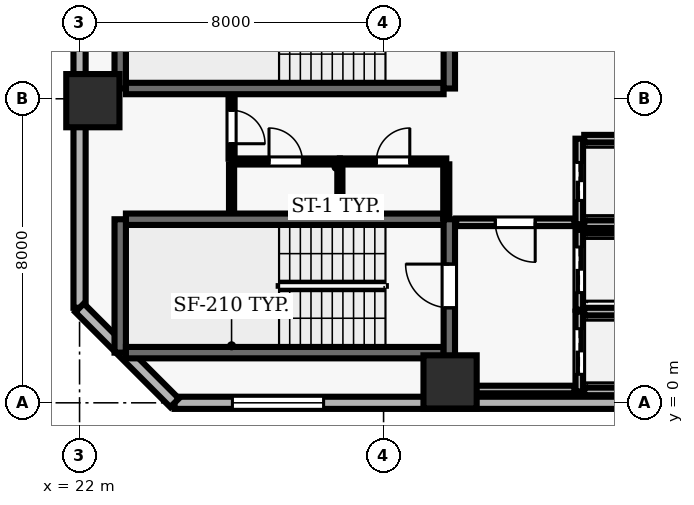
"""IFC4 building model, lengths in metres.
Left out: names, types, materials, properties, quantities, classifications, styles, units other than length and angle.
Written with IfcOpenShell. Run it as: python <this file> out.ifc"""

import sys

from ifc_helpers import new_model, si_unit, direction, frame, frame_2d, origin, origin_2d, place, context, subcontext, project, spatial, rectangle, extrude, element, fill, save


model = new_model("IFC4")
c1 = context("Model", 3, precision=1e-05, world=origin(), true_north=direction((0.0, 1.0)))
c2 = subcontext(c1, "Body", "Model", "MODEL_VIEW")
j1 = project(units=[si_unit("LENGTHUNIT", "METRE"), si_unit("PLANEANGLEUNIT", "RADIAN")], contexts=[c1])
p1 = place(None, origin())
s1 = spatial("IfcSite", under=j1, at=p1, CompositionType="ELEMENT")
p2 = place(p1, origin())
s2 = spatial("IfcBuilding", under=s1, at=p2, CompositionType="ELEMENT")
p3 = place(p2, frame((0.0, 0.0, 81.7)))
s3 = spatial("IfcBuildingStorey", under=s2, at=p3, CompositionType="ELEMENT", Elevation=81.7)
for number, where, z_axis, x_axis in (
    (1, (31.75, 0.55, 0.0), (0.0, 0.0, 1.0), (1.0, 0.0, 0.0)),
    (2, (22.35, 7.95, 0.0), (0.0, 0.0, 1.0), (1.0, 0.0, 0.0)),
):
    element("IfcColumn", number, at=place(p3, frame(where, z_axis=z_axis, x_axis=x_axis)), inside=s3, PredefinedType="COLUMN", context=c2, shape_type="SweptSolid", body=[
        extrude(rectangle(XDim=1.4, YDim=1.4, at=origin_2d()), origin(), (0.0, 0.0, 1.0), 3.9),
    ])
p4 = place(p3, frame((24.5, 0.0, 0.0), z_axis=(0.0, 0.0, 1.0), x_axis=(1.0, 0.0, 0.0)))
e3 = element("IfcWall", 3, at=p4, inside=s3, PredefinedType="SOLIDWALL", context=c2, shape_type="SweptSolid", body=[
    extrude(rectangle(XDim=49.0, YDim=0.32, at=frame_2d((24.5, 0.0))), origin(), (0.0, 0.0, 1.0), 3.69),
])
p5 = place(p4, frame((1.522, 0.0, 0.9)))
e4 = element("IfcOpeningElement", 4, at=p5, cuts=e3, PredefinedType="OPENING", context=c2, shape_type="SweptSolid", body=[
    extrude(rectangle(XDim=2.4, YDim=1.8, at=frame_2d((1.2, 0.9))), frame((0.0, 0.17, 0.0), z_axis=(0.0, -1.0, 0.0), x_axis=(1.0, 0.0, 0.0)), (0.0, 0.0, 1.0), 0.34),
])
p6 = place(p4, frame((17.856, 0.0, 0.9)))
e5 = element("IfcOpeningElement", 5, at=p6, cuts=e3, PredefinedType="OPENING", context=c2, shape_type="SweptSolid", body=[
    extrude(rectangle(XDim=2.4, YDim=1.8, at=frame_2d((1.2, 0.9))), frame((0.0, 0.17, 0.0), z_axis=(0.0, -1.0, 0.0), x_axis=(1.0, 0.0, 0.0)), (0.0, 0.0, 1.0), 0.34),
])
p7 = place(p4, frame((23.3, 0.0, 0.9)))
e6 = element("IfcOpeningElement", 6, at=p7, cuts=e3, PredefinedType="OPENING", context=c2, shape_type="SweptSolid", body=[
    extrude(rectangle(XDim=2.4, YDim=1.8, at=frame_2d((1.2, 0.9))), frame((0.0, 0.17, 0.0), z_axis=(0.0, -1.0, 0.0), x_axis=(1.0, 0.0, 0.0)), (0.0, 0.0, 1.0), 0.34),
])
p8 = place(p4, frame((28.744, 0.0, 0.9)))
e7 = element("IfcOpeningElement", 7, at=p8, cuts=e3, PredefinedType="OPENING", context=c2, shape_type="SweptSolid", body=[
    extrude(rectangle(XDim=2.4, YDim=1.8, at=frame_2d((1.2, 0.9))), frame((0.0, 0.17, 0.0), z_axis=(0.0, -1.0, 0.0), x_axis=(1.0, 0.0, 0.0)), (0.0, 0.0, 1.0), 0.34),
])
p9 = place(p4, frame((34.189, 0.0, 0.9)))
e8 = element("IfcOpeningElement", 8, at=p9, cuts=e3, PredefinedType="OPENING", context=c2, shape_type="SweptSolid", body=[
    extrude(rectangle(XDim=2.4, YDim=1.8, at=frame_2d((1.2, 0.9))), frame((0.0, 0.17, 0.0), z_axis=(0.0, -1.0, 0.0), x_axis=(1.0, 0.0, 0.0)), (0.0, 0.0, 1.0), 0.34),
])
p10 = place(p4, frame((39.633, 0.0, 0.9)))
e9 = element("IfcOpeningElement", 9, at=p10, cuts=e3, PredefinedType="OPENING", context=c2, shape_type="SweptSolid", body=[
    extrude(rectangle(XDim=2.4, YDim=1.8, at=frame_2d((1.2, 0.9))), frame((0.0, 0.17, 0.0), z_axis=(0.0, -1.0, 0.0), x_axis=(1.0, 0.0, 0.0)), (0.0, 0.0, 1.0), 0.34),
])
p11 = place(p4, frame((45.078, 0.0, 0.9)))
e10 = element("IfcOpeningElement", 10, at=p11, cuts=e3, PredefinedType="OPENING", context=c2, shape_type="SweptSolid", body=[
    extrude(rectangle(XDim=2.4, YDim=1.8, at=frame_2d((1.2, 0.9))), frame((0.0, 0.17, 0.0), z_axis=(0.0, -1.0, 0.0), x_axis=(1.0, 0.0, 0.0)), (0.0, 0.0, 1.0), 0.34),
])
p12 = place(p3, frame((22.0, 51.5, 0.0), z_axis=(0.0, 0.0, 1.0), x_axis=(0.0, -1.0, 0.0)))
e11 = element("IfcWall", 11, at=p12, inside=s3, PredefinedType="SOLIDWALL", context=c2, shape_type="SweptSolid", body=[
    extrude(rectangle(XDim=49.0, YDim=0.32, at=frame_2d((24.5, 0.0))), origin(), (0.0, 0.0, 1.0), 3.69),
])
p13 = place(p12, frame((12.1, 0.0, 0.0)))
e12 = element("IfcOpeningElement", 12, at=p13, cuts=e11, PredefinedType="OPENING", context=c2, shape_type="SweptSolid", body=[
    extrude(rectangle(XDim=1.0, YDim=2.2, at=frame_2d((0.5, 1.1))), frame((0.0, 0.17, 0.0), z_axis=(0.0, -1.0, 0.0), x_axis=(1.0, 0.0, 0.0)), (0.0, 0.0, 1.0), 0.34),
])
p14 = place(p12, frame((1.522, 0.0, 0.9)))
e13 = element("IfcOpeningElement", 13, at=p14, cuts=e11, PredefinedType="OPENING", context=c2, shape_type="SweptSolid", body=[
    extrude(rectangle(XDim=2.4, YDim=1.8, at=frame_2d((1.2, 0.9))), frame((0.0, 0.17, 0.0), z_axis=(0.0, -1.0, 0.0), x_axis=(1.0, 0.0, 0.0)), (0.0, 0.0, 1.0), 0.34),
])
p15 = place(p12, frame((6.967, 0.0, 0.9)))
e14 = element("IfcOpeningElement", 14, at=p15, cuts=e11, PredefinedType="OPENING", context=c2, shape_type="SweptSolid", body=[
    extrude(rectangle(XDim=2.4, YDim=1.8, at=frame_2d((1.2, 0.9))), frame((0.0, 0.17, 0.0), z_axis=(0.0, -1.0, 0.0), x_axis=(1.0, 0.0, 0.0)), (0.0, 0.0, 1.0), 0.34),
])
p16 = place(p12, frame((22.4, 0.0, 0.9)))
e15 = element("IfcOpeningElement", 15, at=p16, cuts=e11, PredefinedType="OPENING", context=c2, shape_type="SweptSolid", body=[
    extrude(rectangle(XDim=2.4, YDim=1.8, at=frame_2d((1.2, 0.9))), frame((0.0, 0.17, 0.0), z_axis=(0.0, -1.0, 0.0), x_axis=(1.0, 0.0, 0.0)), (0.0, 0.0, 1.0), 0.34),
])
p17 = place(p12, frame((29.194, 0.0, 0.9)))
e16 = element("IfcOpeningElement", 16, at=p17, cuts=e11, PredefinedType="OPENING", context=c2, shape_type="SweptSolid", body=[
    extrude(rectangle(XDim=2.4, YDim=1.8, at=frame_2d((1.2, 0.9))), frame((0.0, 0.17, 0.0), z_axis=(0.0, -1.0, 0.0), x_axis=(1.0, 0.0, 0.0)), (0.0, 0.0, 1.0), 0.34),
])
p18 = place(p12, frame((33.289, 0.0, 0.9)))
e17 = element("IfcOpeningElement", 17, at=p18, cuts=e11, PredefinedType="OPENING", context=c2, shape_type="SweptSolid", body=[
    extrude(rectangle(XDim=2.4, YDim=1.8, at=frame_2d((1.2, 0.9))), frame((0.0, 0.17, 0.0), z_axis=(0.0, -1.0, 0.0), x_axis=(1.0, 0.0, 0.0)), (0.0, 0.0, 1.0), 0.34),
])
p19 = place(p12, frame((39.633, 0.0, 0.9)))
e18 = element("IfcOpeningElement", 18, at=p19, cuts=e11, PredefinedType="OPENING", context=c2, shape_type="SweptSolid", body=[
    extrude(rectangle(XDim=2.4, YDim=1.8, at=frame_2d((1.2, 0.9))), frame((0.0, 0.17, 0.0), z_axis=(0.0, -1.0, 0.0), x_axis=(1.0, 0.0, 0.0)), (0.0, 0.0, 1.0), 0.34),
])
p20 = place(p3, frame((22.0, 2.5, 0.0), z_axis=(0.0, 0.0, 1.0), x_axis=(0.707106781187, -0.707106781187, 0.0)))
e19 = element("IfcWall", 19, at=p20, inside=s3, PredefinedType="SOLIDWALL", context=c2, shape_type="SweptSolid", body=[
    extrude(rectangle(XDim=3.536, YDim=0.32, at=frame_2d((1.768, 0.0))), origin(), (0.0, 0.0, 1.0), 3.69),
])
p21 = place(p3, frame((31.58, 4.83, 0.0), z_axis=(0.0, 0.0, 1.0), x_axis=(-1.0, 0.0, 0.0)))
e20 = element("IfcWall", 20, at=p21, inside=s3, PredefinedType="SHEAR", context=c2, shape_type="SweptSolid", body=[
    extrude(rectangle(XDim=8.36, YDim=0.3, at=frame_2d((4.18, 0.0))), origin(), (0.0, 0.0, 1.0), 3.69),
])
p22 = place(p3, frame((23.07, 4.83, 0.0), z_axis=(0.0, 0.0, 1.0), x_axis=(0.0, -1.0, 0.0)))
e21 = element("IfcWall", 21, at=p22, inside=s3, PredefinedType="SHEAR", context=c2, shape_type="SweptSolid", body=[
    extrude(rectangle(XDim=3.51, YDim=0.3, at=frame_2d((1.755, 0.0))), origin(), (0.0, 0.0, 1.0), 3.69),
])
p23 = place(p3, frame((23.22, 1.32, 0.0), z_axis=(0.0, 0.0, 1.0), x_axis=(1.0, 0.0, 0.0)))
e22 = element("IfcWall", 22, at=p23, inside=s3, PredefinedType="SHEAR", context=c2, shape_type="SweptSolid", body=[
    extrude(rectangle(XDim=8.36, YDim=0.3, at=frame_2d((4.18, 0.0))), origin(), (0.0, 0.0, 1.0), 3.69),
])
p24 = place(p3, frame((31.73, 0.96, 0.0), z_axis=(0.0, 0.0, 1.0), x_axis=(0.0, 1.0, 0.0)))
e23 = element("IfcWall", 23, at=p24, inside=s3, PredefinedType="SHEAR", context=c2, shape_type="SweptSolid", body=[
    extrude(rectangle(XDim=3.87, YDim=0.3, at=frame_2d((1.935, 0.0))), origin(), (0.0, 0.0, 1.0), 3.69),
])
p25 = place(p24, frame((1.54, 0.0, 0.0)))
e24 = element("IfcOpeningElement", 24, at=p25, cuts=e23, PredefinedType="OPENING", context=c2, shape_type="SweptSolid", body=[
    extrude(rectangle(XDim=1.15, YDim=2.15, at=frame_2d((0.575, 1.075))), frame((0.0, 0.16, 0.0), z_axis=(0.0, -1.0, 0.0), x_axis=(1.0, 0.0, 0.0)), (0.0, 0.0, 1.0), 0.32),
])
p26 = place(p3, frame((23.07, 11.78, 0.0), z_axis=(0.0, 0.0, 1.0), x_axis=(0.0, -1.0, 0.0)))
e25 = element("IfcWall", 25, at=p26, inside=s3, PredefinedType="SHEAR", context=c2, shape_type="SweptSolid", body=[
    extrude(rectangle(XDim=3.51, YDim=0.3, at=frame_2d((1.755, 0.0))), origin(), (0.0, 0.0, 1.0), 3.69),
])
p27 = place(p3, frame((23.22, 8.27, 0.0), z_axis=(0.0, 0.0, 1.0), x_axis=(1.0, 0.0, 0.0)))
e26 = element("IfcWall", 26, at=p27, inside=s3, PredefinedType="SHEAR", context=c2, shape_type="SweptSolid", body=[
    extrude(rectangle(XDim=8.36, YDim=0.3, at=frame_2d((4.18, 0.0))), origin(), (0.0, 0.0, 1.0), 3.69),
])
p28 = place(p3, frame((31.73, 8.27, 0.0), z_axis=(0.0, 0.0, 1.0), x_axis=(0.0, 1.0, 0.0)))
e27 = element("IfcWall", 27, at=p28, inside=s3, PredefinedType="SHEAR", context=c2, shape_type="SweptSolid", body=[
    extrude(rectangle(XDim=3.51, YDim=0.3, at=frame_2d((1.755, 0.0))), origin(), (0.0, 0.0, 1.0), 3.69),
])
p29 = place(p28, frame((1.18, 0.0, 0.0)))
e28 = element("IfcOpeningElement", 28, at=p29, cuts=e27, PredefinedType="OPENING", context=c2, shape_type="SweptSolid", body=[
    extrude(rectangle(XDim=1.15, YDim=2.15, at=frame_2d((0.575, 1.075))), frame((0.0, 0.16, 0.0), z_axis=(0.0, -1.0, 0.0), x_axis=(1.0, 0.0, 0.0)), (0.0, 0.0, 1.0), 0.32),
])
p30 = place(p3, frame((35.15, 2.4, 0.0), z_axis=(0.0, 0.0, 1.0), x_axis=(0.0, -1.0, 0.0)))
e29 = element("IfcWall", 29, at=p30, inside=s3, PredefinedType="SOLIDWALL", context=c2, shape_type="SweptSolid", body=[
    extrude(rectangle(XDim=2.1, YDim=0.2, at=frame_2d((1.05, 0.0))), origin(), (0.0, 0.0, 1.0), 3.69),
])
p31 = place(p30, frame((0.45, 0.0, 0.0)))
e30 = element("IfcOpeningElement", 30, at=p31, cuts=e29, PredefinedType="OPENING", context=c2, shape_type="SweptSolid", body=[
    extrude(rectangle(XDim=1.2, YDim=2.15, at=frame_2d((0.6, 1.075))), frame((0.0, 0.11, 0.0), z_axis=(0.0, -1.0, 0.0), x_axis=(1.0, 0.0, 0.0)), (0.0, 0.0, 1.0), 0.22),
])
for number, where, z_axis, x_axis in (
    (31, (35.28, 0.3, 0.0), (0.0, 0.0, 1.0), (1.0, 0.0, 0.0)),
    (32, (37.42, 2.4, 0.0), (0.0, 0.0, 1.0), (-1.0, 0.0, 0.0)),
):
    element("IfcWall", number, at=place(p3, frame(where, z_axis=z_axis, x_axis=x_axis)), inside=s3, PredefinedType="SOLIDWALL", context=c2, shape_type="SweptSolid", body=[
        extrude(rectangle(XDim=2.14, YDim=0.2, at=frame_2d((1.07, 0.0))), origin(), (0.0, 0.0, 1.0), 3.69),
    ])
p32 = place(p3, frame((35.15, 4.55, 0.0), z_axis=(0.0, 0.0, 1.0), x_axis=(0.0, -1.0, 0.0)))
e33 = element("IfcWall", 33, at=p32, inside=s3, PredefinedType="SOLIDWALL", context=c2, shape_type="SweptSolid", body=[
    extrude(rectangle(XDim=2.1, YDim=0.2, at=frame_2d((1.05, 0.0))), origin(), (0.0, 0.0, 1.0), 3.69),
])
p33 = place(p32, frame((0.45, 0.0, 0.0)))
e34 = element("IfcOpeningElement", 34, at=p33, cuts=e33, PredefinedType="OPENING", context=c2, shape_type="SweptSolid", body=[
    extrude(rectangle(XDim=1.2, YDim=2.15, at=frame_2d((0.6, 1.075))), frame((0.0, 0.11, 0.0), z_axis=(0.0, -1.0, 0.0), x_axis=(1.0, 0.0, 0.0)), (0.0, 0.0, 1.0), 0.22),
])
p34 = place(p3, frame((37.42, 4.55, 0.0), z_axis=(0.0, 0.0, 1.0), x_axis=(-1.0, 0.0, 0.0)))
e35 = element("IfcWall", 35, at=p34, inside=s3, PredefinedType="SOLIDWALL", context=c2, shape_type="SweptSolid", body=[
    extrude(rectangle(XDim=2.14, YDim=0.2, at=frame_2d((1.07, 0.0))), origin(), (0.0, 0.0, 1.0), 3.69),
])
p35 = place(p3, frame((35.15, 6.95, 0.0), z_axis=(0.0, 0.0, 1.0), x_axis=(0.0, -1.0, 0.0)))
e36 = element("IfcWall", 36, at=p35, inside=s3, PredefinedType="SOLIDWALL", context=c2, shape_type="SweptSolid", body=[
    extrude(rectangle(XDim=2.25, YDim=0.2, at=frame_2d((1.125, 0.0))), origin(), (0.0, 0.0, 1.0), 3.69),
])
p36 = place(p35, frame((0.625, 0.0, 0.0)))
e37 = element("IfcOpeningElement", 37, at=p36, cuts=e36, PredefinedType="OPENING", context=c2, shape_type="SweptSolid", body=[
    extrude(rectangle(XDim=1.0, YDim=2.1, at=frame_2d((0.5, 1.05))), frame((0.0, 0.11, 0.0), z_axis=(0.0, -1.0, 0.0), x_axis=(1.0, 0.0, 0.0)), (0.0, 0.0, 1.0), 0.22),
])
for number, where, z_axis, x_axis in (
    (38, (35.28, 4.7, 0.0), (0.0, 0.0, 1.0), (1.0, 0.0, 0.0)),
    (39, (37.42, 6.95, 0.0), (0.0, 0.0, 1.0), (-1.0, 0.0, 0.0)),
):
    element("IfcWall", number, at=place(p3, frame(where, z_axis=z_axis, x_axis=x_axis)), inside=s3, PredefinedType="SOLIDWALL", context=c2, shape_type="SweptSolid", body=[
        extrude(rectangle(XDim=2.14, YDim=0.2, at=frame_2d((1.07, 0.0))), origin(), (0.0, 0.0, 1.0), 3.69),
    ])
p37 = place(p3, frame((26.0, 6.35, 0.0), z_axis=(0.0, 0.0, 1.0), x_axis=(1.0, 0.0, 0.0)))
e40 = element("IfcWall", 40, at=p37, inside=s3, PredefinedType="PARTITIONING", context=c2, shape_type="SweptSolid", body=[
    extrude(rectangle(XDim=2.85, YDim=0.16, at=frame_2d((1.425, 0.0))), origin(), (0.0, 0.0, 1.0), 3.69),
])
p38 = place(p37, frame((0.985, 0.0, 0.0)))
e41 = element("IfcOpeningElement", 41, at=p38, cuts=e40, PredefinedType="OPENING", context=c2, shape_type="SweptSolid", body=[
    extrude(rectangle(XDim=0.88, YDim=2.1, at=frame_2d((0.44, 1.05))), frame((0.0, 0.09, 0.0), z_axis=(0.0, -1.0, 0.0), x_axis=(1.0, 0.0, 0.0)), (0.0, 0.0, 1.0), 0.18),
])
p39 = place(p3, frame((28.85, 6.35, 0.0), z_axis=(0.0, 0.0, 1.0), x_axis=(1.0, 0.0, 0.0)))
e42 = element("IfcWall", 42, at=p39, inside=s3, PredefinedType="PARTITIONING", context=c2, shape_type="SweptSolid", body=[
    extrude(rectangle(XDim=2.8, YDim=0.16, at=frame_2d((1.4, 0.0))), origin(), (0.0, 0.0, 1.0), 3.69),
])
p40 = place(p39, frame((0.96, 0.0, 0.0)))
e43 = element("IfcOpeningElement", 43, at=p40, cuts=e42, PredefinedType="OPENING", context=c2, shape_type="SweptSolid", body=[
    extrude(rectangle(XDim=0.88, YDim=2.1, at=frame_2d((0.44, 1.05))), frame((0.0, 0.09, 0.0), z_axis=(0.0, -1.0, 0.0), x_axis=(1.0, 0.0, 0.0)), (0.0, 0.0, 1.0), 0.18),
])
p41 = place(p3, frame((31.65, 0.35, 0.0), z_axis=(0.0, 0.0, 1.0), x_axis=(1.0, 0.0, 0.0)))
e44 = element("IfcWall", 44, at=p41, inside=s3, PredefinedType="SOLIDWALL", context=c2, shape_type="SweptSolid", body=[
    extrude(rectangle(XDim=3.37, YDim=0.2, at=frame_2d((1.685, 0.0))), origin(), (0.0, 0.0, 1.0), 3.69),
])
p42 = place(p3, frame((35.02, 4.75, 0.0), z_axis=(0.0, 0.0, 1.0), x_axis=(-1.0, 0.0, 0.0)))
e45 = element("IfcWall", 45, at=p42, inside=s3, PredefinedType="SOLIDWALL", context=c2, shape_type="SweptSolid", body=[
    extrude(rectangle(XDim=3.11, YDim=0.2, at=frame_2d((1.555, 0.0))), origin(), (0.0, 0.0, 1.0), 3.69),
])
p43 = place(p42, frame((1.03, 0.0, 0.0)))
e46 = element("IfcOpeningElement", 46, at=p43, cuts=e45, PredefinedType="OPENING", context=c2, shape_type="SweptSolid", body=[
    extrude(rectangle(XDim=1.05, YDim=2.15, at=frame_2d((0.525, 1.075))), frame((0.0, 0.11, 0.0), z_axis=(0.0, -1.0, 0.0), x_axis=(1.0, 0.0, 0.0)), (0.0, 0.0, 1.0), 0.22),
])
p44 = place(p3, frame((26.0, 5.01, 0.0), z_axis=(0.0, 0.0, 1.0), x_axis=(0.0, 1.0, 0.0)))
e47 = element("IfcWall", 47, at=p44, inside=s3, PredefinedType="PARTITIONING", context=c2, shape_type="SweptSolid", body=[
    extrude(rectangle(XDim=1.265, YDim=0.135, at=frame_2d((0.632, 0.0))), origin(), (0.0, 0.0, 1.0), 3.69),
])
p45 = place(p3, frame((26.0, 8.09, 0.0), z_axis=(0.0, 0.0, 1.0), x_axis=(0.0, -1.0, 0.0)))
e48 = element("IfcWall", 48, at=p45, inside=s3, PredefinedType="PARTITIONING", context=c2, shape_type="SweptSolid", body=[
    extrude(rectangle(XDim=1.665, YDim=0.16, at=frame_2d((0.833, 0.0))), origin(), (0.0, 0.0, 1.0), 3.69),
])
p46 = place(p45, frame((0.393, 0.0, 0.0)))
e49 = element("IfcOpeningElement", 49, at=p46, cuts=e48, PredefinedType="OPENING", context=c2, shape_type="SweptSolid", body=[
    extrude(rectangle(XDim=0.88, YDim=2.1, at=frame_2d((0.44, 1.05))), frame((0.0, 0.09, 0.0), z_axis=(0.0, -1.0, 0.0), x_axis=(1.0, 0.0, 0.0)), (0.0, 0.0, 1.0), 0.18),
])
p47 = place(p3, frame((28.85, 5.01, 0.0), z_axis=(0.0, 0.0, 1.0), x_axis=(0.0, 1.0, 0.0)))
e50 = element("IfcWall", 50, at=p47, inside=s3, PredefinedType="PARTITIONING", context=c2, shape_type="SweptSolid", body=[
    extrude(rectangle(XDim=1.265, YDim=0.135, at=frame_2d((0.632, 0.0))), origin(), (0.0, 0.0, 1.0), 3.69),
])
p48 = place(p3, frame((31.65, 4.86, 0.0), z_axis=(0.0, 0.0, 1.0), x_axis=(0.0, 1.0, 0.0)))
e51 = element("IfcWall", 51, at=p48, inside=s3, PredefinedType="PARTITIONING", context=c2, shape_type="SweptSolid", body=[
    extrude(rectangle(XDim=1.415, YDim=0.16, at=frame_2d((0.708, 0.0))), origin(), (0.0, 0.0, 1.0), 3.69),
])
p49 = place(p5, origin())
e52 = element("IfcWindow", 52, at=p49, inside=s3, PartitioningType="SINGLE_PANEL", PredefinedType="WINDOW", context=c2, shape_type="SweptSolid", body=[
    extrude(rectangle(XDim=2.4, YDim=1.8, at=frame_2d((1.2, 0.9))), frame((0.0, 0.03, 0.0), z_axis=(0.0, -1.0, 0.0), x_axis=(1.0, 0.0, 0.0)), (0.0, 0.0, 1.0), 0.06),
])
fill(e4, e52)
p50 = place(p25, origin())
e53 = element("IfcDoor", 53, at=p50, inside=s3, OperationType="SINGLE_SWING_RIGHT", PredefinedType="DOOR", context=c2, shape_type="SweptSolid", body=[
    extrude(rectangle(XDim=1.15, YDim=2.15, at=frame_2d((0.575, 1.075))), frame((0.0, 0.025, 0.0), z_axis=(0.0, -1.0, 0.0), x_axis=(1.0, 0.0, 0.0)), (0.0, 0.0, 1.0), 0.05),
])
fill(e24, e53)
p51 = place(p31, origin())
e54 = element("IfcDoor", 54, at=p51, inside=s3, OperationType="DOUBLE_DOOR_SLIDING", PredefinedType="DOOR", context=c2, shape_type="SweptSolid", body=[
    extrude(rectangle(XDim=1.2, YDim=2.15, at=frame_2d((0.6, 1.075))), frame((0.0, 0.025, 0.0), z_axis=(0.0, -1.0, 0.0), x_axis=(1.0, 0.0, 0.0)), (0.0, 0.0, 1.0), 0.05),
])
fill(e30, e54)
p52 = place(p33, origin())
e55 = element("IfcDoor", 55, at=p52, inside=s3, OperationType="DOUBLE_DOOR_SLIDING", PredefinedType="DOOR", context=c2, shape_type="SweptSolid", body=[
    extrude(rectangle(XDim=1.2, YDim=2.15, at=frame_2d((0.6, 1.075))), frame((0.0, 0.025, 0.0), z_axis=(0.0, -1.0, 0.0), x_axis=(1.0, 0.0, 0.0)), (0.0, 0.0, 1.0), 0.05),
])
fill(e34, e55)
p53 = place(p36, origin())
e56 = element("IfcDoor", 56, at=p53, inside=s3, OperationType="DOUBLE_DOOR_SLIDING", PredefinedType="DOOR", context=c2, shape_type="SweptSolid", body=[
    extrude(rectangle(XDim=1.0, YDim=2.1, at=frame_2d((0.5, 1.05))), frame((0.0, 0.025, 0.0), z_axis=(0.0, -1.0, 0.0), x_axis=(1.0, 0.0, 0.0)), (0.0, 0.0, 1.0), 0.05),
])
fill(e37, e56)
p54 = place(p43, origin())
e57 = element("IfcDoor", 57, at=p54, inside=s3, OperationType="SINGLE_SWING_LEFT", PredefinedType="DOOR", context=c2, shape_type="SweptSolid", body=[
    extrude(rectangle(XDim=1.05, YDim=2.15, at=frame_2d((0.525, 1.075))), frame((0.0, 0.025, 0.0), z_axis=(0.0, -1.0, 0.0), x_axis=(1.0, 0.0, 0.0)), (0.0, 0.0, 1.0), 0.05),
])
fill(e46, e57)
p55 = place(p46, origin())
e58 = element("IfcDoor", 58, at=p55, inside=s3, OperationType="SINGLE_SWING_RIGHT", PredefinedType="DOOR", context=c2, shape_type="SweptSolid", body=[
    extrude(rectangle(XDim=0.88, YDim=2.1, at=frame_2d((0.44, 1.05))), frame((0.0, 0.025, 0.0), z_axis=(0.0, -1.0, 0.0), x_axis=(1.0, 0.0, 0.0)), (0.0, 0.0, 1.0), 0.05),
])
fill(e49, e58)
p56 = place(p38, origin())
e59 = element("IfcDoor", 59, at=p56, inside=s3, OperationType="SINGLE_SWING_LEFT", PredefinedType="DOOR", context=c2, shape_type="SweptSolid", body=[
    extrude(rectangle(XDim=0.88, YDim=2.1, at=frame_2d((0.44, 1.05))), frame((0.0, 0.025, 0.0), z_axis=(0.0, -1.0, 0.0), x_axis=(1.0, 0.0, 0.0)), (0.0, 0.0, 1.0), 0.05),
])
fill(e41, e59)
p57 = place(p40, origin())
e60 = element("IfcDoor", 60, at=p57, inside=s3, OperationType="SINGLE_SWING_RIGHT", PredefinedType="DOOR", context=c2, shape_type="SweptSolid", body=[
    extrude(rectangle(XDim=0.88, YDim=2.1, at=frame_2d((0.44, 1.05))), frame((0.0, 0.025, 0.0), z_axis=(0.0, -1.0, 0.0), x_axis=(1.0, 0.0, 0.0)), (0.0, 0.0, 1.0), 0.05),
])
fill(e43, e60)
save(model, sys.argv[1])
